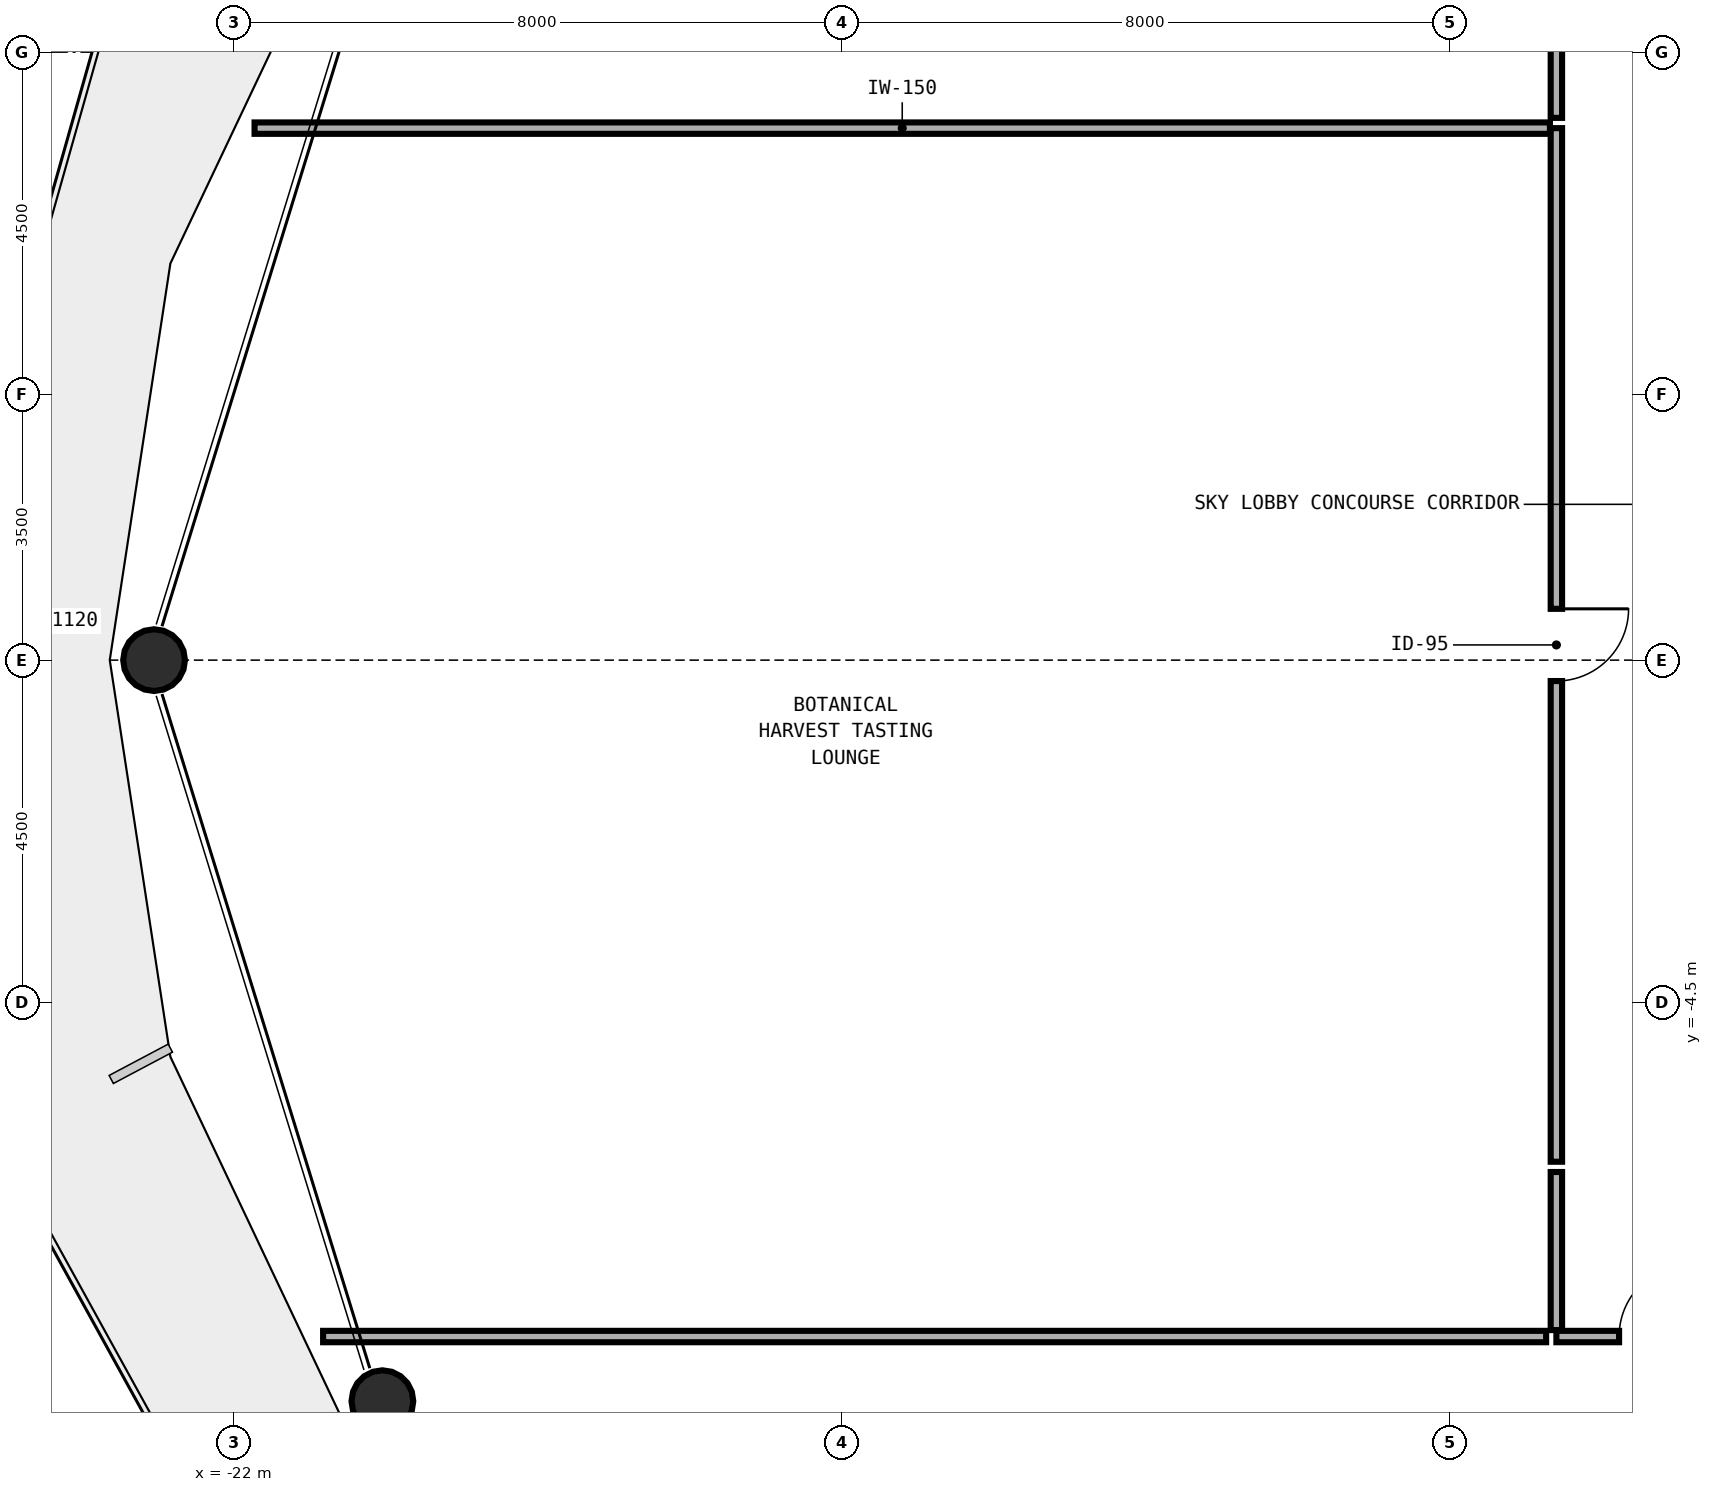
"""IFC4 building model, lengths in metres.
Left out: names, types, materials, properties, quantities, classifications, styles, units other than length and angle.
Written with IfcOpenShell. Run it as: python <this file> out.ifc"""

import sys

from ifc_helpers import new_model, si_unit, direction, frame, frame_2d, origin, origin_2d, place, context, subcontext, project, spatial, rectangle, hollow_circle, extrude, element, fill, save


model = new_model("IFC4")
c1 = context("Model", 3, precision=1e-05, world=origin(), true_north=direction((0.0, 1.0)))
c2 = subcontext(c1, "Body", "Model", "MODEL_VIEW")
j1 = project(units=[si_unit("LENGTHUNIT", "METRE"), si_unit("PLANEANGLEUNIT", "RADIAN")], contexts=[c1])
p1 = place(None, origin())
s1 = spatial("IfcSite", under=j1, at=p1, CompositionType="ELEMENT")
p2 = place(p1, origin())
s2 = spatial("IfcBuilding", under=s1, at=p2, CompositionType="ELEMENT")
p3 = place(p2, frame((0.0, 0.0, 103.2)))
s3 = spatial("IfcBuildingStorey", under=s2, at=p3, CompositionType="ELEMENT", Elevation=103.2)
for number, where, z_axis, x_axis in (
    (1, (-23.083, 0.0, 0.0), (0.017, 0.0, 1.0), (0.0, 1.0, 0.0)),
    (2, (-20.074, -9.762, 0.0), (0.015, 0.006, 1.0), (-0.386, 0.922, 0.0)),
):
    element("IfcColumn", number, at=place(p3, frame(where, z_axis=z_axis, x_axis=x_axis)), inside=s3, PredefinedType="COLUMN", context=c2, shape_type="SweptSolid", body=[
        extrude(hollow_circle(Radius=0.406, WallThickness=0.03, at=origin_2d()), origin(), (0.0, 0.0, 1.0), 3.875),
    ])
p4 = place(p3, frame((-4.6, -8.9, 0.0), z_axis=(0.0, 0.0, 1.0), x_axis=(1.0, 0.0, 0.0)))
e3 = element("IfcWall", 3, at=p4, inside=s3, PredefinedType="PARTITIONING", context=c2, shape_type="SweptSolid", body=[
    extrude(rectangle(XDim=2.6, YDim=0.15, at=frame_2d((1.3, 0.0))), origin(), (0.0, 0.0, 1.0), 3.64),
])
p5 = place(p4, frame((0.825, 0.0, 0.0)))
e4 = element("IfcOpeningElement", 4, at=p5, cuts=e3, PredefinedType="OPENING", context=c2, shape_type="SweptSolid", body=[
    extrude(rectangle(XDim=0.95, YDim=2.1, at=frame_2d((0.475, 1.05))), frame((0.0, 0.085, 0.0), z_axis=(0.0, -1.0, 0.0), x_axis=(1.0, 0.0, 0.0)), (0.0, 0.0, 1.0), 0.17),
])
p6 = place(p3, frame((-4.6, 7.0, 0.0), z_axis=(0.0, 0.0, 1.0), x_axis=(0.0, -1.0, 0.0)))
e5 = element("IfcWall", 5, at=p6, inside=s3, PredefinedType="PARTITIONING", context=c2, shape_type="SweptSolid", body=[
    extrude(rectangle(XDim=13.6, YDim=0.15, at=frame_2d((6.8, 0.0))), origin(), (0.0, 0.0, 1.0), 3.64),
])
p7 = place(p6, frame((6.325, 0.0, 0.0)))
e6 = element("IfcOpeningElement", 6, at=p7, cuts=e5, PredefinedType="OPENING", context=c2, shape_type="SweptSolid", body=[
    extrude(rectangle(XDim=0.95, YDim=2.1, at=frame_2d((0.475, 1.05))), frame((0.0, 0.085, 0.0), z_axis=(0.0, -1.0, 0.0), x_axis=(1.0, 0.0, 0.0)), (0.0, 0.0, 1.0), 0.17),
])
p8 = place(p3, frame((-4.6, 12.5, 0.0), z_axis=(0.0, 0.0, 1.0), x_axis=(0.0, -1.0, 0.0)))
e7 = element("IfcWall", 7, at=p8, inside=s3, PredefinedType="PARTITIONING", context=c2, shape_type="SweptSolid", body=[
    extrude(rectangle(XDim=5.365, YDim=0.15, at=frame_2d((2.683, 0.0))), origin(), (0.0, 0.0, 1.0), 3.64),
])
p9 = place(p8, frame((2.275, 0.0, 0.0)))
e8 = element("IfcOpeningElement", 8, at=p9, cuts=e7, PredefinedType="OPENING", context=c2, shape_type="SweptSolid", body=[
    extrude(rectangle(XDim=0.95, YDim=2.1, at=frame_2d((0.475, 1.05))), frame((0.0, 0.085, 0.0), z_axis=(0.0, -1.0, 0.0), x_axis=(1.0, 0.0, 0.0)), (0.0, 0.0, 1.0), 0.17),
])
p10 = place(p3, frame((-20.826, -8.9, 0.0), z_axis=(0.0, 0.0, 1.0), x_axis=(1.0, 0.0, 0.0)))
e9 = element("IfcWall", 9, at=p10, inside=s3, PredefinedType="PARTITIONING", context=c2, shape_type="SweptSolid", body=[
    extrude(rectangle(XDim=16.091, YDim=0.15, at=frame_2d((8.045, 0.0))), origin(), (0.0, 0.0, 1.0), 3.022),
])
p11 = place(p3, frame((-4.6, -6.735, 0.0), z_axis=(0.0, 0.0, 1.0), x_axis=(0.0, -1.0, 0.0)))
e10 = element("IfcWall", 10, at=p11, inside=s3, PredefinedType="PARTITIONING", context=c2, shape_type="SweptSolid", body=[
    extrude(rectangle(XDim=2.08, YDim=0.15, at=frame_2d((1.04, 0.0))), origin(), (0.0, 0.0, 1.0), 3.64),
])
p12 = place(p3, frame((-21.728, 7.0, 0.0), z_axis=(0.0, 0.0, 1.0), x_axis=(1.0, 0.0, 0.0)))
e11 = element("IfcWall", 11, at=p12, inside=s3, PredefinedType="PARTITIONING", context=c2, shape_type="SweptSolid", body=[
    extrude(rectangle(XDim=17.043, YDim=0.15, at=frame_2d((8.521, 0.0))), origin(), (0.0, 0.0, 1.0), 3.64),
])
p13 = place(p5, origin())
e12 = element("IfcDoor", 12, at=p13, inside=s3, OperationType="SINGLE_SWING_RIGHT", PredefinedType="DOOR", context=c2, shape_type="SweptSolid", body=[
    extrude(rectangle(XDim=0.95, YDim=2.1, at=frame_2d((0.475, 1.05))), frame((0.0, 0.025, 0.0), z_axis=(0.0, -1.0, 0.0), x_axis=(1.0, 0.0, 0.0)), (0.0, 0.0, 1.0), 0.05),
])
fill(e4, e12)
p14 = place(p7, origin())
e13 = element("IfcDoor", 13, at=p14, inside=s3, OperationType="SINGLE_SWING_LEFT", PredefinedType="DOOR", context=c2, shape_type="SweptSolid", body=[
    extrude(rectangle(XDim=0.95, YDim=2.1, at=frame_2d((0.475, 1.05))), frame((0.0, 0.025, 0.0), z_axis=(0.0, -1.0, 0.0), x_axis=(1.0, 0.0, 0.0)), (0.0, 0.0, 1.0), 0.05),
])
fill(e6, e13)
save(model, sys.argv[1])
